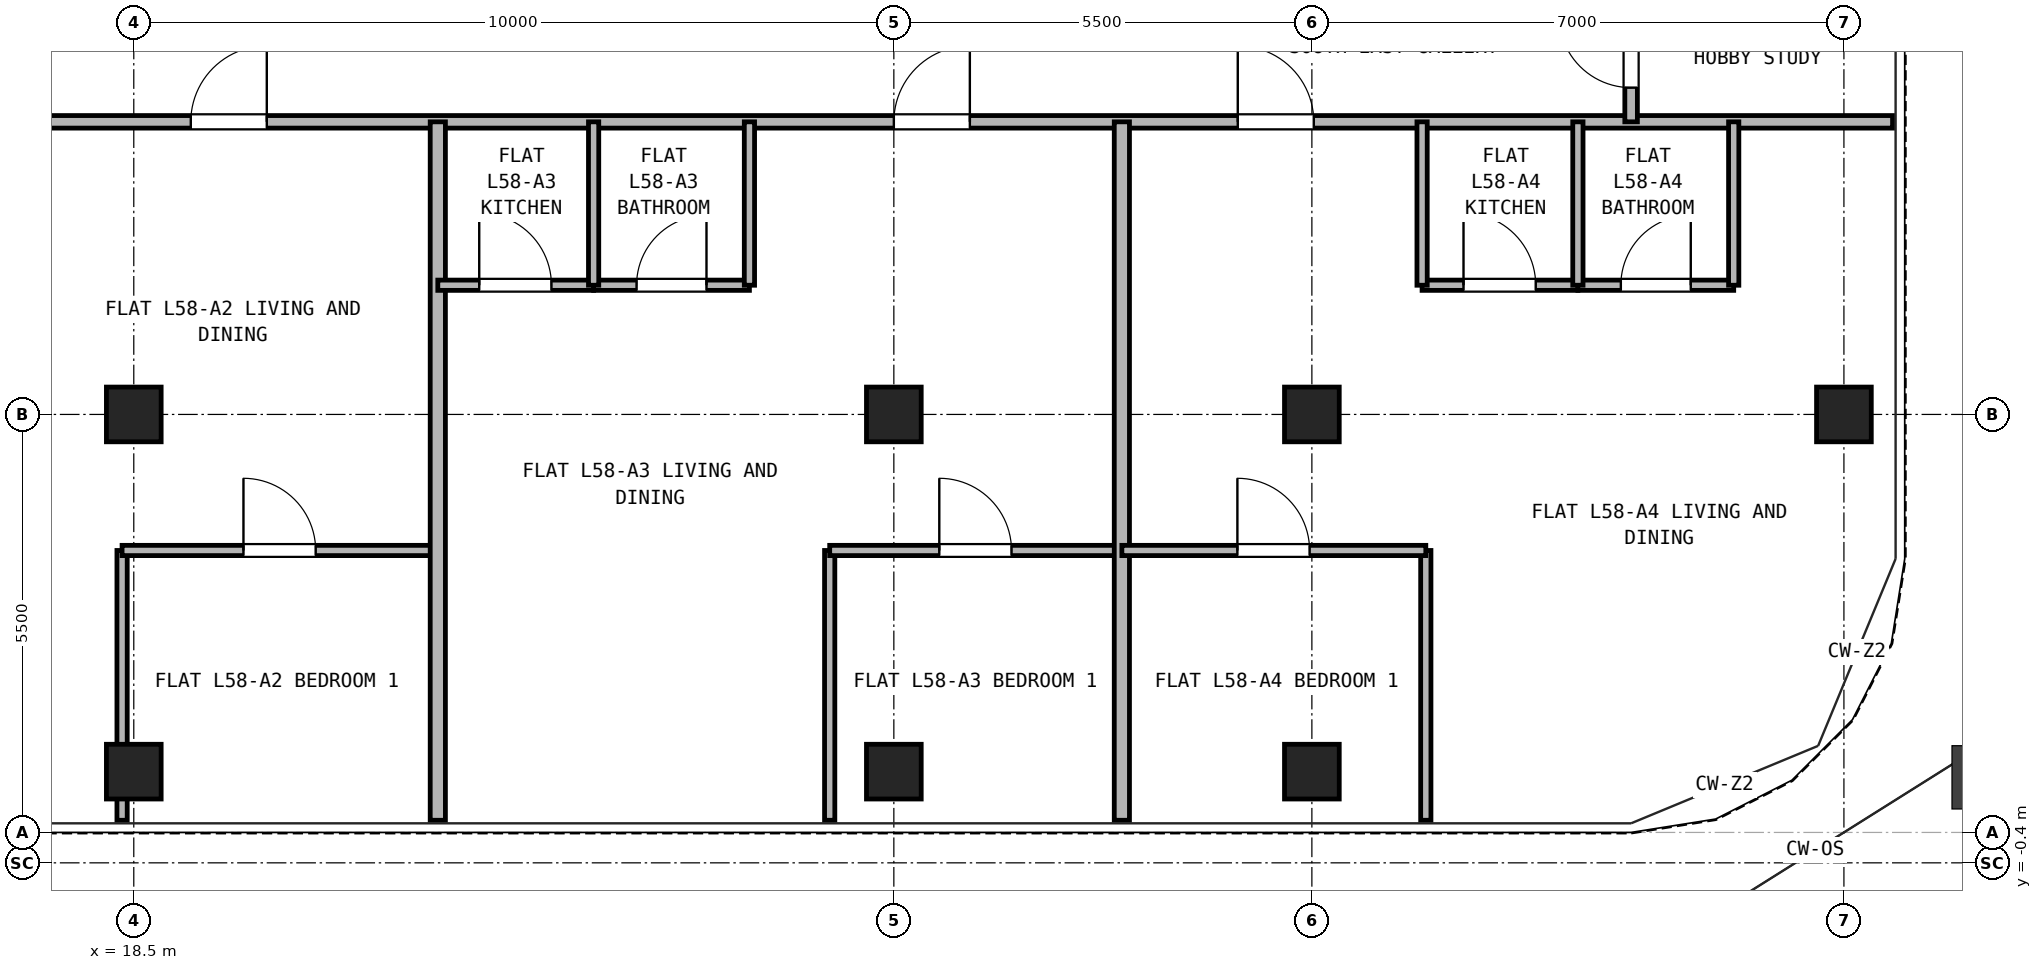
"""IFC4 building model, lengths in metres.
Left out: names, types, materials, properties, quantities, classifications, styles, units other than length and angle.
Written with IfcOpenShell. Run it as: python <this file> out.ifc"""

import sys

from ifc_helpers import new_model, si_unit, direction, frame, frame_2d, origin, origin_2d, place, context, subcontext, project, spatial, rectangle, hollow_rectangle, extrude, source, transform, mapped, element, fill, save


model = new_model("IFC4")
c1 = context("Model", 3, precision=1e-05, world=origin(), true_north=direction((0.0, 1.0)))
c2 = subcontext(c1, "Body", "Model", "MODEL_VIEW")
j1 = project(units=[si_unit("LENGTHUNIT", "METRE"), si_unit("PLANEANGLEUNIT", "RADIAN")], contexts=[c1])
p1 = place(None, origin())
s1 = spatial("IfcSite", under=j1, at=p1, CompositionType="ELEMENT")
p2 = place(p1, origin())
s2 = spatial("IfcBuilding", under=s1, at=p2, CompositionType="ELEMENT")
p3 = place(p2, frame((0.0, 0.0, 206.0)))
s3 = spatial("IfcBuildingStorey", under=s2, at=p3, CompositionType="ELEMENT", Elevation=206.0)
m1 = source(origin(), c2, "Body", "SweptSolid", [
    extrude(hollow_rectangle(XDim=0.72, YDim=0.72, WallThickness=0.04, at=origin_2d()), origin(), (0.0, 0.0, 1.0), 2.95),
])
for number, where, z_axis, x_axis in (
    (1, (18.5, 0.8, 0.0), (0.0, 0.0, 1.0), (1.0, 0.0, 0.0)),
    (2, (28.5, 0.8, 0.0), (0.0, 0.0, 1.0), (1.0, 0.0, 0.0)),
    (3, (34.0, 0.8, 0.0), (0.0, 0.0, 1.0), (1.0, 0.0, 0.0)),
    (4, (41.0, 5.5, 0.0), (0.0, 0.0, 1.0), (1.0, 0.0, 0.0)),
    (5, (18.5, 5.5, 0.0), (0.0, 0.0, 1.0), (1.0, 0.0, 0.0)),
    (6, (28.5, 5.5, 0.0), (0.0, 0.0, 1.0), (1.0, 0.0, 0.0)),
    (7, (34.0, 5.5, 0.0), (0.0, 0.0, 1.0), (1.0, 0.0, 0.0)),
):
    element("IfcColumn", number, at=place(p3, frame(where, z_axis=z_axis, x_axis=x_axis)), inside=s3, PredefinedType="COLUMN", context=c2, shape_type="MappedRepresentation", body=[
        mapped(m1, transform((0.0, 0.0, 0.0), x_axis=(1.0, 0.0, 0.0), y_axis=(0.0, 1.0, 0.0), z_axis=(0.0, 0.0, 1.0), scale=1.0)),
    ])
p4 = place(p3, frame((0.16, 9.35, 0.0), z_axis=(0.0, 0.0, 1.0), x_axis=(1.0, 0.0, 0.0)))
e8 = element("IfcWall", 8, at=p4, inside=s3, PredefinedType="PARTITIONING", context=c2, shape_type="SweptSolid", body=[
    extrude(rectangle(XDim=41.48, YDim=0.165, at=frame_2d((20.74, 0.0))), origin(), (0.0, 0.0, 1.0), 2.95),
])
p5 = place(p4, frame((9.64, 0.0, 0.0)))
e9 = element("IfcOpeningElement", 9, at=p5, cuts=e8, PredefinedType="OPENING", context=c2, shape_type="SweptSolid", body=[
    extrude(rectangle(XDim=1.0, YDim=2.15, at=frame_2d((0.5, 1.075))), frame((0.0, 0.093, 0.0), z_axis=(0.0, -1.0, 0.0), x_axis=(1.0, 0.0, 0.0)), (0.0, 0.0, 1.0), 0.185),
])
p6 = place(p4, frame((19.09, 0.0, 0.0)))
e10 = element("IfcOpeningElement", 10, at=p6, cuts=e8, PredefinedType="OPENING", context=c2, shape_type="SweptSolid", body=[
    extrude(rectangle(XDim=1.0, YDim=2.15, at=frame_2d((0.5, 1.075))), frame((0.0, 0.093, 0.0), z_axis=(0.0, -1.0, 0.0), x_axis=(1.0, 0.0, 0.0)), (0.0, 0.0, 1.0), 0.185),
])
p7 = place(p4, frame((28.34, 0.0, 0.0)))
e11 = element("IfcOpeningElement", 11, at=p7, cuts=e8, PredefinedType="OPENING", context=c2, shape_type="SweptSolid", body=[
    extrude(rectangle(XDim=1.0, YDim=2.15, at=frame_2d((0.5, 1.075))), frame((0.0, 0.093, 0.0), z_axis=(0.0, -1.0, 0.0), x_axis=(1.0, 0.0, 0.0)), (0.0, 0.0, 1.0), 0.185),
])
p8 = place(p4, frame((32.865, 0.0, 0.0)))
e12 = element("IfcOpeningElement", 12, at=p8, cuts=e8, PredefinedType="OPENING", context=c2, shape_type="SweptSolid", body=[
    extrude(rectangle(XDim=1.0, YDim=2.15, at=frame_2d((0.5, 1.075))), frame((0.0, 0.093, 0.0), z_axis=(0.0, -1.0, 0.0), x_axis=(1.0, 0.0, 0.0)), (0.0, 0.0, 1.0), 0.185),
])
p9 = place(p3, frame((38.2, 9.35, 0.0), z_axis=(0.0, 0.0, 1.0), x_axis=(0.0, 1.0, 0.0)))
e13 = element("IfcWall", 13, at=p9, inside=s3, PredefinedType="PARTITIONING", context=c2, shape_type="SweptSolid", body=[
    extrude(rectangle(XDim=2.0, YDim=0.165, at=frame_2d((1.0, 0.0))), origin(), (0.0, 0.0, 1.0), 2.95),
])
p10 = place(p9, frame((0.45, 0.0, 0.0)))
e14 = element("IfcOpeningElement", 14, at=p10, cuts=e13, PredefinedType="OPENING", context=c2, shape_type="SweptSolid", body=[
    extrude(rectangle(XDim=0.95, YDim=2.15, at=frame_2d((0.475, 1.075))), frame((0.0, 0.093, 0.0), z_axis=(0.0, -1.0, 0.0), x_axis=(1.0, 0.0, 0.0)), (0.0, 0.0, 1.0), 0.185),
])
p11 = place(p3, frame((18.346, 0.16, 0.0), z_axis=(0.0, 0.0, 1.0), x_axis=(0.0, 1.0, 0.0)))
e15 = element("IfcWall", 15, at=p11, inside=s3, PredefinedType="PARTITIONING", context=c2, shape_type="SweptSolid", body=[
    extrude(rectangle(XDim=3.55, YDim=0.135, at=frame_2d((1.775, 0.0))), origin(), (0.0, 0.0, 1.0), 2.323),
])
p12 = place(p3, frame((18.346, 3.71, 0.0), z_axis=(0.0, 0.0, 1.0), x_axis=(1.0, 0.0, 0.0)))
e16 = element("IfcWall", 16, at=p12, inside=s3, PredefinedType="PARTITIONING", context=c2, shape_type="SweptSolid", body=[
    extrude(rectangle(XDim=4.154, YDim=0.135, at=frame_2d((2.077, 0.0))), origin(), (0.0, 0.0, 1.0), 2.95),
])
p13 = place(p12, frame((1.597, 0.0, 0.0)))
e17 = element("IfcOpeningElement", 17, at=p13, cuts=e16, PredefinedType="OPENING", context=c2, shape_type="SweptSolid", body=[
    extrude(rectangle(XDim=0.95, YDim=2.15, at=frame_2d((0.475, 1.075))), frame((0.0, 0.077, 0.0), z_axis=(0.0, -1.0, 0.0), x_axis=(1.0, 0.0, 0.0)), (0.0, 0.0, 1.0), 0.155),
])
p14 = place(p3, frame((22.5, 0.16, 0.0), z_axis=(0.0, 0.0, 1.0), x_axis=(0.0, 1.0, 0.0)))
e18 = element("IfcWall", 18, at=p14, inside=s3, PredefinedType="PARTITIONING", context=c2, shape_type="SweptSolid", body=[
    extrude(rectangle(XDim=9.19, YDim=0.2, at=frame_2d((4.595, 0.0))), origin(), (0.0, 0.0, 1.0), 2.95),
])
p15 = place(p3, frame((22.5, 7.2, 0.0), z_axis=(0.0, 0.0, 1.0), x_axis=(1.0, 0.0, 0.0)))
e19 = element("IfcWall", 19, at=p15, inside=s3, PredefinedType="PARTITIONING", context=c2, shape_type="SweptSolid", body=[
    extrude(rectangle(XDim=2.05, YDim=0.135, at=frame_2d((1.025, 0.0))), origin(), (0.0, 0.0, 1.0), 2.95),
])
p16 = place(p15, frame((0.545, 0.0, 0.0)))
e20 = element("IfcOpeningElement", 20, at=p16, cuts=e19, PredefinedType="OPENING", context=c2, shape_type="SweptSolid", body=[
    extrude(rectangle(XDim=0.95, YDim=2.15, at=frame_2d((0.475, 1.075))), frame((0.0, 0.077, 0.0), z_axis=(0.0, -1.0, 0.0), x_axis=(1.0, 0.0, 0.0)), (0.0, 0.0, 1.0), 0.155),
])
p17 = place(p3, frame((24.55, 7.2, 0.0), z_axis=(0.0, 0.0, 1.0), x_axis=(1.0, 0.0, 0.0)))
e21 = element("IfcWall", 21, at=p17, inside=s3, PredefinedType="PARTITIONING", context=c2, shape_type="SweptSolid", body=[
    extrude(rectangle(XDim=2.05, YDim=0.135, at=frame_2d((1.025, 0.0))), origin(), (0.0, 0.0, 1.0), 2.95),
])
p18 = place(p17, frame((0.565, 0.0, 0.0)))
e22 = element("IfcOpeningElement", 22, at=p18, cuts=e21, PredefinedType="OPENING", context=c2, shape_type="SweptSolid", body=[
    extrude(rectangle(XDim=0.92, YDim=2.1, at=frame_2d((0.46, 1.05))), frame((0.0, 0.077, 0.0), z_axis=(0.0, -1.0, 0.0), x_axis=(1.0, 0.0, 0.0)), (0.0, 0.0, 1.0), 0.155),
])
for number, where, z_axis, x_axis in (
    (23, (24.55, 7.2, 0.0), (0.0, 0.0, 1.0), (0.0, 1.0, 0.0)),
    (24, (26.6, 7.2, 0.0), (0.0, 0.0, 1.0), (0.0, 1.0, 0.0)),
):
    element("IfcWall", number, at=place(p3, frame(where, z_axis=z_axis, x_axis=x_axis)), inside=s3, PredefinedType="PARTITIONING", context=c2, shape_type="SweptSolid", body=[
        extrude(rectangle(XDim=2.15, YDim=0.135, at=frame_2d((1.075, 0.0))), origin(), (0.0, 0.0, 1.0), 2.95),
    ])
p19 = place(p3, frame((27.656, 0.16, 0.0), z_axis=(0.0, 0.0, 1.0), x_axis=(0.0, 1.0, 0.0)))
e25 = element("IfcWall", 25, at=p19, inside=s3, PredefinedType="PARTITIONING", context=c2, shape_type="SweptSolid", body=[
    extrude(rectangle(XDim=3.55, YDim=0.135, at=frame_2d((1.775, 0.0))), origin(), (0.0, 0.0, 1.0), 2.95),
])
p20 = place(p3, frame((27.656, 3.71, 0.0), z_axis=(0.0, 0.0, 1.0), x_axis=(1.0, 0.0, 0.0)))
e26 = element("IfcWall", 26, at=p20, inside=s3, PredefinedType="PARTITIONING", context=c2, shape_type="SweptSolid", body=[
    extrude(rectangle(XDim=3.844, YDim=0.135, at=frame_2d((1.922, 0.0))), origin(), (0.0, 0.0, 1.0), 2.95),
])
p21 = place(p20, frame((1.442, 0.0, 0.0)))
e27 = element("IfcOpeningElement", 27, at=p21, cuts=e26, PredefinedType="OPENING", context=c2, shape_type="SweptSolid", body=[
    extrude(rectangle(XDim=0.95, YDim=2.15, at=frame_2d((0.475, 1.075))), frame((0.0, 0.077, 0.0), z_axis=(0.0, -1.0, 0.0), x_axis=(1.0, 0.0, 0.0)), (0.0, 0.0, 1.0), 0.155),
])
p22 = place(p3, frame((31.5, 0.16, 0.0), z_axis=(0.0, 0.0, 1.0), x_axis=(0.0, 1.0, 0.0)))
e28 = element("IfcWall", 28, at=p22, inside=s3, PredefinedType="PARTITIONING", context=c2, shape_type="SweptSolid", body=[
    extrude(rectangle(XDim=9.19, YDim=0.2, at=frame_2d((4.595, 0.0))), origin(), (0.0, 0.0, 1.0), 2.95),
])
p23 = place(p3, frame((35.45, 7.2, 0.0), z_axis=(0.0, 0.0, 1.0), x_axis=(1.0, 0.0, 0.0)))
e29 = element("IfcWall", 29, at=p23, inside=s3, PredefinedType="PARTITIONING", context=c2, shape_type="SweptSolid", body=[
    extrude(rectangle(XDim=2.05, YDim=0.135, at=frame_2d((1.025, 0.0))), origin(), (0.0, 0.0, 1.0), 2.95),
])
p24 = place(p23, frame((0.545, 0.0, 0.0)))
e30 = element("IfcOpeningElement", 30, at=p24, cuts=e29, PredefinedType="OPENING", context=c2, shape_type="SweptSolid", body=[
    extrude(rectangle(XDim=0.95, YDim=2.15, at=frame_2d((0.475, 1.075))), frame((0.0, 0.077, 0.0), z_axis=(0.0, -1.0, 0.0), x_axis=(1.0, 0.0, 0.0)), (0.0, 0.0, 1.0), 0.155),
])
p25 = place(p3, frame((37.5, 7.2, 0.0), z_axis=(0.0, 0.0, 1.0), x_axis=(1.0, 0.0, 0.0)))
e31 = element("IfcWall", 31, at=p25, inside=s3, PredefinedType="PARTITIONING", context=c2, shape_type="SweptSolid", body=[
    extrude(rectangle(XDim=2.05, YDim=0.135, at=frame_2d((1.025, 0.0))), origin(), (0.0, 0.0, 1.0), 2.95),
])
p26 = place(p25, frame((0.565, 0.0, 0.0)))
e32 = element("IfcOpeningElement", 32, at=p26, cuts=e31, PredefinedType="OPENING", context=c2, shape_type="SweptSolid", body=[
    extrude(rectangle(XDim=0.92, YDim=2.1, at=frame_2d((0.46, 1.05))), frame((0.0, 0.077, 0.0), z_axis=(0.0, -1.0, 0.0), x_axis=(1.0, 0.0, 0.0)), (0.0, 0.0, 1.0), 0.155),
])
for number, where, z_axis, x_axis in (
    (33, (35.45, 7.2, 0.0), (0.0, 0.0, 1.0), (0.0, 1.0, 0.0)),
    (34, (37.5, 7.2, 0.0), (0.0, 0.0, 1.0), (0.0, 1.0, 0.0)),
    (35, (39.55, 7.2, 0.0), (0.0, 0.0, 1.0), (0.0, 1.0, 0.0)),
):
    element("IfcWall", number, at=place(p3, frame(where, z_axis=z_axis, x_axis=x_axis)), inside=s3, PredefinedType="PARTITIONING", context=c2, shape_type="SweptSolid", body=[
        extrude(rectangle(XDim=2.15, YDim=0.135, at=frame_2d((1.075, 0.0))), origin(), (0.0, 0.0, 1.0), 2.95),
    ])
p27 = place(p3, frame((35.499, 0.16, 0.0), z_axis=(0.0, 0.0, 1.0), x_axis=(0.0, 1.0, 0.0)))
e36 = element("IfcWall", 36, at=p27, inside=s3, PredefinedType="PARTITIONING", context=c2, shape_type="SweptSolid", body=[
    extrude(rectangle(XDim=3.55, YDim=0.135, at=frame_2d((1.775, 0.0))), origin(), (0.0, 0.0, 1.0), 2.95),
])
p28 = place(p3, frame((31.5, 3.71, 0.0), z_axis=(0.0, 0.0, 1.0), x_axis=(1.0, 0.0, 0.0)))
e37 = element("IfcWall", 37, at=p28, inside=s3, PredefinedType="PARTITIONING", context=c2, shape_type="SweptSolid", body=[
    extrude(rectangle(XDim=3.999, YDim=0.135, at=frame_2d((2.0, 0.0))), origin(), (0.0, 0.0, 1.0), 2.95),
])
p29 = place(p28, frame((1.52, 0.0, 0.0)))
e38 = element("IfcOpeningElement", 38, at=p29, cuts=e37, PredefinedType="OPENING", context=c2, shape_type="SweptSolid", body=[
    extrude(rectangle(XDim=0.95, YDim=2.15, at=frame_2d((0.475, 1.075))), frame((0.0, 0.077, 0.0), z_axis=(0.0, -1.0, 0.0), x_axis=(1.0, 0.0, 0.0)), (0.0, 0.0, 1.0), 0.155),
])
p30 = place(p13, frame((0.95, 0.0, 0.0), z_axis=(0.0, 0.0, 1.0), x_axis=(-1.0, 0.0, 0.0)))
e39 = element("IfcDoor", 39, at=p30, inside=s3, OperationType="SINGLE_SWING_LEFT", PredefinedType="DOOR", context=c2, shape_type="SweptSolid", body=[
    extrude(rectangle(XDim=0.95, YDim=2.15, at=frame_2d((0.475, 1.075))), frame((0.0, 0.025, 0.0), z_axis=(0.0, -1.0, 0.0), x_axis=(1.0, 0.0, 0.0)), (0.0, 0.0, 1.0), 0.05),
])
fill(e17, e39)
p31 = place(p6, frame((1.0, 0.0, 0.0), z_axis=(0.0, 0.0, 1.0), x_axis=(-1.0, 0.0, 0.0)))
e40 = element("IfcDoor", 40, at=p31, inside=s3, OperationType="SINGLE_SWING_RIGHT", PredefinedType="DOOR", context=c2, shape_type="SweptSolid", body=[
    extrude(rectangle(XDim=1.0, YDim=2.15, at=frame_2d((0.5, 1.075))), frame((0.0, 0.025, 0.0), z_axis=(0.0, -1.0, 0.0), x_axis=(1.0, 0.0, 0.0)), (0.0, 0.0, 1.0), 0.05),
])
fill(e10, e40)
p32 = place(p16, origin())
e41 = element("IfcDoor", 41, at=p32, inside=s3, OperationType="SINGLE_SWING_LEFT", PredefinedType="DOOR", context=c2, shape_type="SweptSolid", body=[
    extrude(rectangle(XDim=0.95, YDim=2.15, at=frame_2d((0.475, 1.075))), frame((0.0, 0.025, 0.0), z_axis=(0.0, -1.0, 0.0), x_axis=(1.0, 0.0, 0.0)), (0.0, 0.0, 1.0), 0.05),
])
fill(e20, e41)
p33 = place(p18, origin())
e42 = element("IfcDoor", 42, at=p33, inside=s3, OperationType="SINGLE_SWING_RIGHT", PredefinedType="DOOR", context=c2, shape_type="SweptSolid", body=[
    extrude(rectangle(XDim=0.92, YDim=2.1, at=frame_2d((0.46, 1.05))), frame((0.0, 0.025, 0.0), z_axis=(0.0, -1.0, 0.0), x_axis=(1.0, 0.0, 0.0)), (0.0, 0.0, 1.0), 0.05),
])
fill(e22, e42)
p34 = place(p21, frame((0.95, 0.0, 0.0), z_axis=(0.0, 0.0, 1.0), x_axis=(-1.0, 0.0, 0.0)))
e43 = element("IfcDoor", 43, at=p34, inside=s3, OperationType="SINGLE_SWING_LEFT", PredefinedType="DOOR", context=c2, shape_type="SweptSolid", body=[
    extrude(rectangle(XDim=0.95, YDim=2.15, at=frame_2d((0.475, 1.075))), frame((0.0, 0.025, 0.0), z_axis=(0.0, -1.0, 0.0), x_axis=(1.0, 0.0, 0.0)), (0.0, 0.0, 1.0), 0.05),
])
fill(e27, e43)
p35 = place(p7, frame((1.0, 0.0, 0.0), z_axis=(0.0, 0.0, 1.0), x_axis=(-1.0, 0.0, 0.0)))
e44 = element("IfcDoor", 44, at=p35, inside=s3, OperationType="SINGLE_SWING_RIGHT", PredefinedType="DOOR", context=c2, shape_type="SweptSolid", body=[
    extrude(rectangle(XDim=1.0, YDim=2.15, at=frame_2d((0.5, 1.075))), frame((0.0, 0.025, 0.0), z_axis=(0.0, -1.0, 0.0), x_axis=(1.0, 0.0, 0.0)), (0.0, 0.0, 1.0), 0.05),
])
fill(e11, e44)
p36 = place(p24, origin())
e45 = element("IfcDoor", 45, at=p36, inside=s3, OperationType="SINGLE_SWING_LEFT", PredefinedType="DOOR", context=c2, shape_type="SweptSolid", body=[
    extrude(rectangle(XDim=0.95, YDim=2.15, at=frame_2d((0.475, 1.075))), frame((0.0, 0.025, 0.0), z_axis=(0.0, -1.0, 0.0), x_axis=(1.0, 0.0, 0.0)), (0.0, 0.0, 1.0), 0.05),
])
fill(e30, e45)
p37 = place(p26, origin())
e46 = element("IfcDoor", 46, at=p37, inside=s3, OperationType="SINGLE_SWING_RIGHT", PredefinedType="DOOR", context=c2, shape_type="SweptSolid", body=[
    extrude(rectangle(XDim=0.92, YDim=2.1, at=frame_2d((0.46, 1.05))), frame((0.0, 0.025, 0.0), z_axis=(0.0, -1.0, 0.0), x_axis=(1.0, 0.0, 0.0)), (0.0, 0.0, 1.0), 0.05),
])
fill(e32, e46)
p38 = place(p29, frame((0.95, 0.0, 0.0), z_axis=(0.0, 0.0, 1.0), x_axis=(-1.0, 0.0, 0.0)))
e47 = element("IfcDoor", 47, at=p38, inside=s3, OperationType="SINGLE_SWING_LEFT", PredefinedType="DOOR", context=c2, shape_type="SweptSolid", body=[
    extrude(rectangle(XDim=0.95, YDim=2.15, at=frame_2d((0.475, 1.075))), frame((0.0, 0.025, 0.0), z_axis=(0.0, -1.0, 0.0), x_axis=(1.0, 0.0, 0.0)), (0.0, 0.0, 1.0), 0.05),
])
fill(e38, e47)
p39 = place(p8, frame((1.0, 0.0, 0.0), z_axis=(0.0, 0.0, 1.0), x_axis=(-1.0, 0.0, 0.0)))
e48 = element("IfcDoor", 48, at=p39, inside=s3, OperationType="SINGLE_SWING_LEFT", PredefinedType="DOOR", context=c2, shape_type="SweptSolid", body=[
    extrude(rectangle(XDim=1.0, YDim=2.15, at=frame_2d((0.5, 1.075))), frame((0.0, 0.025, 0.0), z_axis=(0.0, -1.0, 0.0), x_axis=(1.0, 0.0, 0.0)), (0.0, 0.0, 1.0), 0.05),
])
fill(e12, e48)
p40 = place(p10, origin())
e49 = element("IfcDoor", 49, at=p40, inside=s3, OperationType="SINGLE_SWING_RIGHT", PredefinedType="DOOR", context=c2, shape_type="SweptSolid", body=[
    extrude(rectangle(XDim=0.95, YDim=2.15, at=frame_2d((0.475, 1.075))), frame((0.0, 0.025, 0.0), z_axis=(0.0, -1.0, 0.0), x_axis=(1.0, 0.0, 0.0)), (0.0, 0.0, 1.0), 0.05),
])
fill(e14, e49)
save(model, sys.argv[1])
